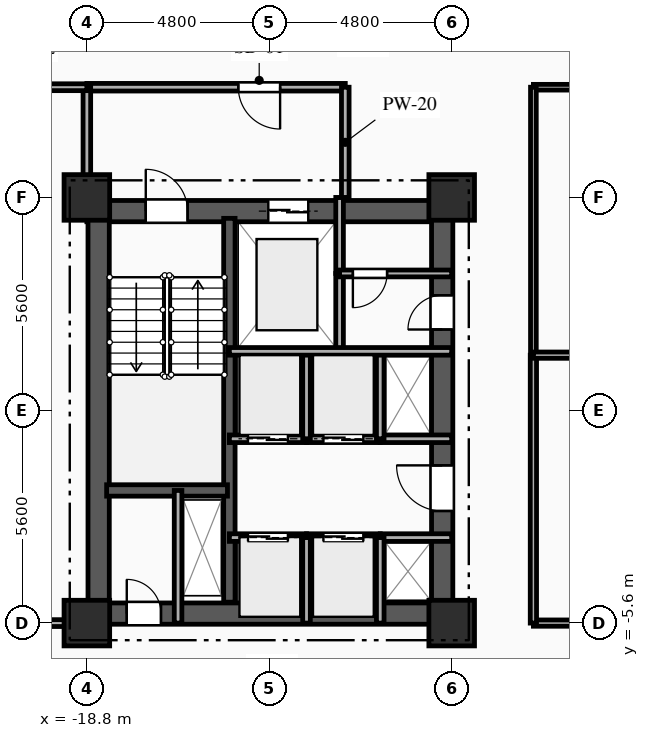
"""IFC4 building model, lengths in metres.
Left out: names, types, materials, properties, quantities, classifications, styles, units other than length and angle.
Written with IfcOpenShell. Run it as: python <this file> out.ifc"""

import sys

from ifc_helpers import new_model, si_unit, direction, frame, frame_2d, origin, origin_2d, place, context, subcontext, project, spatial, rectangle, extrude, element, fill, save


model = new_model("IFC4")
c1 = context("Model", 3, precision=1e-05, world=origin(), true_north=direction((0.0, 1.0)))
c2 = subcontext(c1, "Body", "Model", "MODEL_VIEW")
j1 = project(units=[si_unit("LENGTHUNIT", "METRE"), si_unit("PLANEANGLEUNIT", "RADIAN")], contexts=[c1])
p1 = place(None, origin())
s1 = spatial("IfcSite", under=j1, at=p1, CompositionType="ELEMENT")
p2 = place(p1, origin())
s2 = spatial("IfcBuilding", under=s1, at=p2, CompositionType="ELEMENT")
p3 = place(p2, frame((0.0, 0.0, 43.75)))
s3 = spatial("IfcBuildingStorey", under=s2, at=p3, CompositionType="ELEMENT", Elevation=43.75)
for number, where, z_axis, x_axis in (
    (1, (-18.8, -5.6, 0.0), (0.0, 0.0, 1.0), (1.0, 0.0, 0.0)),
    (2, (-18.8, 5.6, 0.0), (0.0, 0.0, 1.0), (1.0, 0.0, 0.0)),
    (3, (-9.2, -5.6, 0.0), (0.0, 0.0, 1.0), (1.0, 0.0, 0.0)),
    (4, (-9.2, 5.6, 0.0), (0.0, 0.0, 1.0), (1.0, 0.0, 0.0)),
):
    element("IfcColumn", number, at=place(p3, frame(where, z_axis=z_axis, x_axis=x_axis)), inside=s3, PredefinedType="COLUMN", context=c2, shape_type="SweptSolid", body=[
        extrude(rectangle(XDim=1.2, YDim=1.2, at=origin_2d()), origin(), (0.0, 0.0, 1.0), 3.35),
    ])
p4 = place(p3, frame((-18.8, 5.24, 0.0), z_axis=(0.0, 0.0, 1.0), x_axis=(1.0, 0.0, 0.0)))
e5 = element("IfcWall", 5, at=p4, inside=s3, PredefinedType="SHEAR", context=c2, shape_type="SweptSolid", body=[
    extrude(rectangle(XDim=9.6, YDim=0.56, at=frame_2d((4.8, 0.0))), origin(), (0.0, 0.0, 1.0), 3.035),
])
p5 = place(p4, frame((1.55, 0.0, 0.0)))
e6 = element("IfcOpeningElement", 6, at=p5, cuts=e5, PredefinedType="OPENING", context=c2, shape_type="SweptSolid", body=[
    extrude(rectangle(XDim=1.1, YDim=2.15, at=frame_2d((0.55, 1.075))), frame((0.0, 0.29, 0.0), z_axis=(0.0, -1.0, 0.0), x_axis=(1.0, 0.0, 0.0)), (0.0, 0.0, 1.0), 0.58),
])
p6 = place(p4, frame((4.775, 0.0, 0.0)))
e7 = element("IfcOpeningElement", 7, at=p6, cuts=e5, PredefinedType="OPENING", context=c2, shape_type="SweptSolid", body=[
    extrude(rectangle(XDim=1.05, YDim=2.1, at=frame_2d((0.525, 1.05))), frame((0.0, 0.29, 0.0), z_axis=(0.0, -1.0, 0.0), x_axis=(1.0, 0.0, 0.0)), (0.0, 0.0, 1.0), 0.58),
])
p7 = place(p3, frame((-18.8, -5.35, 0.0), z_axis=(0.0, 0.0, 1.0), x_axis=(1.0, 0.0, 0.0)))
e8 = element("IfcWall", 8, at=p7, inside=s3, PredefinedType="SHEAR", context=c2, shape_type="SweptSolid", body=[
    extrude(rectangle(XDim=9.6, YDim=0.56, at=frame_2d((4.8, 0.0))), origin(), (0.0, 0.0, 1.0), 3.035),
])
p8 = place(p7, frame((1.05, 0.0, 0.0)))
e9 = element("IfcOpeningElement", 9, at=p8, cuts=e8, PredefinedType="OPENING", context=c2, shape_type="SweptSolid", body=[
    extrude(rectangle(XDim=0.9, YDim=2.1, at=frame_2d((0.45, 1.05))), frame((0.0, 0.29, 0.0), z_axis=(0.0, -1.0, 0.0), x_axis=(1.0, 0.0, 0.0)), (0.0, 0.0, 1.0), 0.58),
])
p9 = place(p3, frame((-18.49, -5.05, 0.0), z_axis=(0.0, 0.0, 1.0), x_axis=(0.0, 1.0, 0.0)))
e10 = element("IfcWall", 10, at=p9, inside=s3, PredefinedType="SHEAR", context=c2, shape_type="SweptSolid", body=[
    extrude(rectangle(XDim=10.1, YDim=0.56, at=frame_2d((5.05, 0.0))), origin(), (0.0, 0.0, 1.0), 3.035),
])
p10 = place(p3, frame((-9.45, -5.05, 0.0), z_axis=(0.0, 0.0, 1.0), x_axis=(0.0, 1.0, 0.0)))
e11 = element("IfcWall", 11, at=p10, inside=s3, PredefinedType="SHEAR", context=c2, shape_type="SweptSolid", body=[
    extrude(rectangle(XDim=10.1, YDim=0.56, at=frame_2d((5.05, 0.0))), origin(), (0.0, 0.0, 1.0), 3.035),
])
p11 = place(p10, frame((7.175, 0.0, 0.0)))
e12 = element("IfcOpeningElement", 12, at=p11, cuts=e11, PredefinedType="OPENING", context=c2, shape_type="SweptSolid", body=[
    extrude(rectangle(XDim=0.9, YDim=2.1, at=frame_2d((0.45, 1.05))), frame((0.0, 0.29, 0.0), z_axis=(0.0, -1.0, 0.0), x_axis=(1.0, 0.0, 0.0)), (0.0, 0.0, 1.0), 0.58),
])
p12 = place(p10, frame((2.4, 0.0, 0.0)))
e13 = element("IfcOpeningElement", 13, at=p12, cuts=e11, PredefinedType="OPENING", context=c2, shape_type="SweptSolid", body=[
    extrude(rectangle(XDim=1.2, YDim=2.15, at=frame_2d((0.6, 1.075))), frame((0.0, 0.29, 0.0), z_axis=(0.0, -1.0, 0.0), x_axis=(1.0, 0.0, 0.0)), (0.0, 0.0, 1.0), 0.58),
])
p13 = place(p3, frame((-15.05, -5.05, 0.0), z_axis=(0.0, 0.0, 1.0), x_axis=(0.0, 1.0, 0.0)))
e14 = element("IfcWall", 14, at=p13, inside=s3, PredefinedType="SHEAR", context=c2, shape_type="SweptSolid", body=[
    extrude(rectangle(XDim=10.1, YDim=0.3, at=frame_2d((5.05, 0.0))), origin(), (0.0, 0.0, 1.0), 3.035),
])
p14 = place(p3, frame((-18.28, -2.11, 0.0), z_axis=(0.0, 0.0, 1.0), x_axis=(1.0, 0.0, 0.0)))
e15 = element("IfcWall", 15, at=p14, inside=s3, PredefinedType="SHEAR", context=c2, shape_type="SweptSolid", body=[
    extrude(rectangle(XDim=3.18, YDim=0.3, at=frame_2d((1.59, 0.0))), origin(), (0.0, 0.0, 1.0), 3.035),
])
p15 = place(p3, frame((-16.4, -5.6, 0.0), z_axis=(0.0, 0.0, 1.0), x_axis=(0.0, 1.0, 0.0)))
e16 = element("IfcWall", 16, at=p15, inside=s3, PredefinedType="PARTITIONING", context=c2, shape_type="SweptSolid", body=[
    extrude(rectangle(XDim=3.49, YDim=0.2, at=frame_2d((1.745, 0.0))), origin(), (0.0, 0.0, 1.0), 3.035),
])
p16 = place(p3, frame((-12.15, 1.55, 0.0), z_axis=(0.0, 0.0, 1.0), x_axis=(0.0, 1.0, 0.0)))
e17 = element("IfcWall", 17, at=p16, inside=s3, PredefinedType="PARTITIONING", context=c2, shape_type="SweptSolid", body=[
    extrude(rectangle(XDim=2.05, YDim=0.2, at=frame_2d((1.025, 0.0))), origin(), (0.0, 0.0, 1.0), 3.035),
])
p17 = place(p3, frame((-12.15, 3.6, 0.0), z_axis=(0.0, 0.0, 1.0), x_axis=(0.0, 1.0, 0.0)))
e18 = element("IfcWall", 18, at=p17, inside=s3, PredefinedType="PARTITIONING", context=c2, shape_type="SweptSolid", body=[
    extrude(rectangle(XDim=2.0, YDim=0.2, at=frame_2d((1.0, 0.0))), origin(), (0.0, 0.0, 1.0), 3.035),
])
p18 = place(p3, frame((-12.0, 8.5, 0.0), z_axis=(0.0, 0.0, 1.0), x_axis=(-1.0, 0.0, 0.0)))
e19 = element("IfcWall", 19, at=p18, inside=s3, PredefinedType="PARTITIONING", context=c2, shape_type="SweptSolid", body=[
    extrude(rectangle(XDim=6.8, YDim=0.2, at=frame_2d((3.4, 0.0))), origin(), (0.0, 0.0, 1.0), 3.035),
])
p19 = place(p18, frame((1.715, 0.0, 0.0)))
e20 = element("IfcOpeningElement", 20, at=p19, cuts=e19, PredefinedType="OPENING", context=c2, shape_type="SweptSolid", body=[
    extrude(rectangle(XDim=1.1, YDim=2.15, at=frame_2d((0.55, 1.075))), frame((0.0, 0.11, 0.0), z_axis=(0.0, -1.0, 0.0), x_axis=(1.0, 0.0, 0.0)), (0.0, 0.0, 1.0), 0.22),
])
p20 = place(p3, frame((-12.0, 5.6, 0.0), z_axis=(0.0, 0.0, 1.0), x_axis=(0.0, 1.0, 0.0)))
e21 = element("IfcWall", 21, at=p20, inside=s3, PredefinedType="PARTITIONING", context=c2, shape_type="SweptSolid", body=[
    extrude(rectangle(XDim=2.9, YDim=0.2, at=frame_2d((1.45, 0.0))), origin(), (0.0, 0.0, 1.0), 3.035),
])
p21 = place(p3, frame((-18.8, 8.5, 0.0), z_axis=(0.0, 0.0, 1.0), x_axis=(0.0, -1.0, 0.0)))
e22 = element("IfcWall", 22, at=p21, inside=s3, PredefinedType="PARTITIONING", context=c2, shape_type="SweptSolid", body=[
    extrude(rectangle(XDim=2.9, YDim=0.2, at=frame_2d((1.45, 0.0))), origin(), (0.0, 0.0, 1.0), 2.52),
])
p22 = place(p3, frame((-9.2, 3.6, 0.0), z_axis=(0.0, 0.0, 1.0), x_axis=(-1.0, 0.0, 0.0)))
e23 = element("IfcWall", 23, at=p22, inside=s3, PredefinedType="PARTITIONING", context=c2, shape_type="SweptSolid", body=[
    extrude(rectangle(XDim=2.95, YDim=0.18, at=frame_2d((1.475, 0.0))), origin(), (0.0, 0.0, 1.0), 3.035),
])
p23 = place(p22, frame((1.7, 0.0, 0.0)))
e24 = element("IfcOpeningElement", 24, at=p23, cuts=e23, PredefinedType="OPENING", context=c2, shape_type="SweptSolid", body=[
    extrude(rectangle(XDim=0.9, YDim=2.1, at=frame_2d((0.45, 1.05))), frame((0.0, 0.1, 0.0), z_axis=(0.0, -1.0, 0.0), x_axis=(1.0, 0.0, 0.0)), (0.0, 0.0, 1.0), 0.2),
])
p24 = place(p3, frame((-15.05, -3.35, 0.0), z_axis=(0.0, 0.0, 1.0), x_axis=(1.0, 0.0, 0.0)))
e25 = element("IfcWall", 25, at=p24, inside=s3, PredefinedType="PARTITIONING", context=c2, shape_type="SweptSolid", body=[
    extrude(rectangle(XDim=2.03, YDim=0.2, at=frame_2d((1.015, 0.0))), origin(), (0.0, 0.0, 1.0), 3.035),
])
p25 = place(p24, frame((0.49, 0.0, 0.0)))
e26 = element("IfcOpeningElement", 26, at=p25, cuts=e25, PredefinedType="OPENING", context=c2, shape_type="SweptSolid", body=[
    extrude(rectangle(XDim=1.05, YDim=2.1, at=frame_2d((0.525, 1.05))), frame((0.0, 0.11, 0.0), z_axis=(0.0, -1.0, 0.0), x_axis=(1.0, 0.0, 0.0)), (0.0, 0.0, 1.0), 0.22),
])
p26 = place(p3, frame((-13.02, -3.35, 0.0), z_axis=(0.0, 0.0, 1.0), x_axis=(1.0, 0.0, 0.0)))
e27 = element("IfcWall", 27, at=p26, inside=s3, PredefinedType="PARTITIONING", context=c2, shape_type="SweptSolid", body=[
    extrude(rectangle(XDim=1.94, YDim=0.2, at=frame_2d((0.97, 0.0))), origin(), (0.0, 0.0, 1.0), 3.035),
])
p27 = place(p26, frame((0.445, 0.0, 0.0)))
e28 = element("IfcOpeningElement", 28, at=p27, cuts=e27, PredefinedType="OPENING", context=c2, shape_type="SweptSolid", body=[
    extrude(rectangle(XDim=1.05, YDim=2.1, at=frame_2d((0.525, 1.05))), frame((0.0, 0.11, 0.0), z_axis=(0.0, -1.0, 0.0), x_axis=(1.0, 0.0, 0.0)), (0.0, 0.0, 1.0), 0.22),
])
p28 = place(p3, frame((-11.08, -3.35, 0.0), z_axis=(0.0, 0.0, 1.0), x_axis=(1.0, 0.0, 0.0)))
e29 = element("IfcWall", 29, at=p28, inside=s3, PredefinedType="PARTITIONING", context=c2, shape_type="SweptSolid", body=[
    extrude(rectangle(XDim=1.88, YDim=0.2, at=frame_2d((0.94, 0.0))), origin(), (0.0, 0.0, 1.0), 2.75),
])
p29 = place(p3, frame((-13.02, -0.75, 0.0), z_axis=(0.0, 0.0, 1.0), x_axis=(-1.0, 0.0, 0.0)))
e30 = element("IfcWall", 30, at=p29, inside=s3, PredefinedType="PARTITIONING", context=c2, shape_type="SweptSolid", body=[
    extrude(rectangle(XDim=2.03, YDim=0.2, at=frame_2d((1.015, 0.0))), origin(), (0.0, 0.0, 1.0), 3.035),
])
p30 = place(p29, frame((0.49, 0.0, 0.0)))
e31 = element("IfcOpeningElement", 31, at=p30, cuts=e30, PredefinedType="OPENING", context=c2, shape_type="SweptSolid", body=[
    extrude(rectangle(XDim=1.05, YDim=2.1, at=frame_2d((0.525, 1.05))), frame((0.0, 0.11, 0.0), z_axis=(0.0, -1.0, 0.0), x_axis=(1.0, 0.0, 0.0)), (0.0, 0.0, 1.0), 0.22),
])
p31 = place(p3, frame((-11.08, -0.75, 0.0), z_axis=(0.0, 0.0, 1.0), x_axis=(-1.0, 0.0, 0.0)))
e32 = element("IfcWall", 32, at=p31, inside=s3, PredefinedType="PARTITIONING", context=c2, shape_type="SweptSolid", body=[
    extrude(rectangle(XDim=1.94, YDim=0.2, at=frame_2d((0.97, 0.0))), origin(), (0.0, 0.0, 1.0), 3.035),
])
p32 = place(p31, frame((0.445, 0.0, 0.0)))
e33 = element("IfcOpeningElement", 33, at=p32, cuts=e32, PredefinedType="OPENING", context=c2, shape_type="SweptSolid", body=[
    extrude(rectangle(XDim=1.05, YDim=2.1, at=frame_2d((0.525, 1.05))), frame((0.0, 0.11, 0.0), z_axis=(0.0, -1.0, 0.0), x_axis=(1.0, 0.0, 0.0)), (0.0, 0.0, 1.0), 0.22),
])
p33 = place(p3, frame((-9.2, -0.75, 0.0), z_axis=(0.0, 0.0, 1.0), x_axis=(-1.0, 0.0, 0.0)))
e34 = element("IfcWall", 34, at=p33, inside=s3, PredefinedType="PARTITIONING", context=c2, shape_type="SweptSolid", body=[
    extrude(rectangle(XDim=1.88, YDim=0.2, at=frame_2d((0.94, 0.0))), origin(), (0.0, 0.0, 1.0), 3.035),
])
for number, where, z_axis, x_axis in (
    (35, (-13.02, -5.6, 0.0), (0.0, 0.0, 1.0), (0.0, 1.0, 0.0)),
    (36, (-11.08, -5.6, 0.0), (0.0, 0.0, 1.0), (0.0, 1.0, 0.0)),
):
    element("IfcWall", number, at=place(p3, frame(where, z_axis=z_axis, x_axis=x_axis)), inside=s3, PredefinedType="PARTITIONING", context=c2, shape_type="SweptSolid", body=[
        extrude(rectangle(XDim=2.25, YDim=0.2, at=frame_2d((1.125, 0.0))), origin(), (0.0, 0.0, 1.0), 3.035),
    ])
for number, where, z_axis, x_axis in (
    (37, (-13.02, -0.75, 0.0), (0.0, 0.0, 1.0), (0.0, 1.0, 0.0)),
    (38, (-11.08, -0.75, 0.0), (0.0, 0.0, 1.0), (0.0, 1.0, 0.0)),
):
    element("IfcWall", number, at=place(p3, frame(where, z_axis=z_axis, x_axis=x_axis)), inside=s3, PredefinedType="PARTITIONING", context=c2, shape_type="SweptSolid", body=[
        extrude(rectangle(XDim=2.3, YDim=0.2, at=frame_2d((1.15, 0.0))), origin(), (0.0, 0.0, 1.0), 3.035),
    ])
p34 = place(p3, frame((-18.8, 8.5, 0.0), z_axis=(0.0, 0.0, 1.0), x_axis=(-1.0, 0.0, 0.0)))
e39 = element("IfcWall", 39, at=p34, inside=s3, PredefinedType="PARTITIONING", context=c2, shape_type="SweptSolid", body=[
    extrude(rectangle(XDim=2.65, YDim=0.18, at=frame_2d((1.325, 0.0))), origin(), (0.0, 0.0, 1.0), 3.035),
])
p35 = place(p34, frame((1.009, 0.0, 0.0)))
e40 = element("IfcOpeningElement", 40, at=p35, cuts=e39, PredefinedType="OPENING", context=c2, shape_type="SweptSolid", body=[
    extrude(rectangle(XDim=1.0, YDim=2.15, at=frame_2d((0.5, 1.075))), frame((0.0, 0.1, 0.0), z_axis=(0.0, -1.0, 0.0), x_axis=(1.0, 0.0, 0.0)), (0.0, 0.0, 1.0), 0.2),
])
p36 = place(p3, frame((0.0, 8.5, 0.0), z_axis=(0.0, 0.0, 1.0), x_axis=(-1.0, 0.0, 0.0)))
e41 = element("IfcWall", 41, at=p36, inside=s3, PredefinedType="PARTITIONING", context=c2, shape_type="SweptSolid", body=[
    extrude(rectangle(XDim=7.05, YDim=0.15, at=frame_2d((3.525, 0.0))), origin(), (0.0, 0.0, 1.0), 3.035),
])
p37 = place(p36, frame((1.185, 0.0, 0.0)))
e42 = element("IfcOpeningElement", 42, at=p37, cuts=e41, PredefinedType="OPENING", context=c2, shape_type="SweptSolid", body=[
    extrude(rectangle(XDim=1.05, YDim=2.15, at=frame_2d((0.525, 1.075))), frame((0.0, 0.085, 0.0), z_axis=(0.0, -1.0, 0.0), x_axis=(1.0, 0.0, 0.0)), (0.0, 0.0, 1.0), 0.17),
])
p38 = place(p3, frame((-21.45, -5.6, 0.0), z_axis=(0.0, 0.0, 1.0), x_axis=(1.0, 0.0, 0.0)))
e43 = element("IfcWall", 43, at=p38, inside=s3, PredefinedType="PARTITIONING", context=c2, shape_type="SweptSolid", body=[
    extrude(rectangle(XDim=2.65, YDim=0.18, at=frame_2d((1.325, 0.0))), origin(), (0.0, 0.0, 1.0), 3.035),
])
p39 = place(p3, frame((-7.05, -5.6, 0.0), z_axis=(0.0, 0.0, 1.0), x_axis=(1.0, 0.0, 0.0)))
e44 = element("IfcWall", 44, at=p39, inside=s3, PredefinedType="PARTITIONING", context=c2, shape_type="SweptSolid", body=[
    extrude(rectangle(XDim=7.05, YDim=0.165, at=frame_2d((3.525, 0.0))), origin(), (0.0, 0.0, 1.0), 2.52),
])
p40 = place(p39, frame((4.728, 0.0, 0.0)))
e45 = element("IfcOpeningElement", 45, at=p40, cuts=e44, PredefinedType="OPENING", context=c2, shape_type="SweptSolid", body=[
    extrude(rectangle(XDim=1.15, YDim=2.15, at=frame_2d((0.575, 1.075))), frame((0.0, 0.093, 0.0), z_axis=(0.0, -1.0, 0.0), x_axis=(1.0, 0.0, 0.0)), (0.0, 0.0, 1.0), 0.185),
])
p41 = place(p3, frame((-7.05, 1.45, 0.0), z_axis=(0.0, 0.0, 1.0), x_axis=(0.0, -1.0, 0.0)))
e46 = element("IfcWall", 46, at=p41, inside=s3, PredefinedType="PARTITIONING", context=c2, shape_type="SweptSolid", body=[
    extrude(rectangle(XDim=7.05, YDim=0.165, at=frame_2d((3.525, 0.0))), origin(), (0.0, 0.0, 1.0), 3.035),
])
p42 = place(p3, frame((-7.05, 8.5, 0.0), z_axis=(0.0, 0.0, 1.0), x_axis=(0.0, -1.0, 0.0)))
e47 = element("IfcWall", 47, at=p42, inside=s3, PredefinedType="PARTITIONING", context=c2, shape_type="SweptSolid", body=[
    extrude(rectangle(XDim=7.05, YDim=0.15, at=frame_2d((3.525, 0.0))), origin(), (0.0, 0.0, 1.0), 3.035),
])
p43 = place(p3, frame((-7.05, 1.45, 0.0), z_axis=(0.0, 0.0, 1.0), x_axis=(1.0, 0.0, 0.0)))
e48 = element("IfcWall", 48, at=p43, inside=s3, PredefinedType="PARTITIONING", context=c2, shape_type="SweptSolid", body=[
    extrude(rectangle(XDim=14.1, YDim=0.165, at=frame_2d((7.05, 0.0))), origin(), (0.0, 0.0, 1.0), 3.035),
])
p44 = place(p3, frame((-15.05, 1.55, 0.0), z_axis=(0.0, 0.0, 1.0), x_axis=(1.0, 0.0, 0.0)))
e49 = element("IfcWall", 49, at=p44, inside=s3, PredefinedType="PARTITIONING", context=c2, shape_type="SweptSolid", body=[
    extrude(rectangle(XDim=5.85, YDim=0.2, at=frame_2d((2.925, 0.0))), origin(), (0.0, 0.0, 1.0), 3.035),
])
p45 = place(p5, origin())
e50 = element("IfcDoor", 50, at=p45, inside=s3, OperationType="SINGLE_SWING_LEFT", PredefinedType="DOOR", context=c2, shape_type="SweptSolid", body=[
    extrude(rectangle(XDim=1.1, YDim=2.15, at=frame_2d((0.55, 1.075))), frame((0.0, 0.025, 0.0), z_axis=(0.0, -1.0, 0.0), x_axis=(1.0, 0.0, 0.0)), (0.0, 0.0, 1.0), 0.05),
])
fill(e6, e50)
p46 = place(p6, origin())
e51 = element("IfcDoor", 51, at=p46, inside=s3, OperationType="DOUBLE_DOOR_SLIDING", PredefinedType="DOOR", context=c2, shape_type="SweptSolid", body=[
    extrude(rectangle(XDim=1.05, YDim=2.1, at=frame_2d((0.525, 1.05))), frame((0.0, 0.025, 0.0), z_axis=(0.0, -1.0, 0.0), x_axis=(1.0, 0.0, 0.0)), (0.0, 0.0, 1.0), 0.05),
])
fill(e7, e51)
p47 = place(p8, origin())
e52 = element("IfcDoor", 52, at=p47, inside=s3, OperationType="SINGLE_SWING_LEFT", PredefinedType="DOOR", context=c2, shape_type="SweptSolid", body=[
    extrude(rectangle(XDim=0.9, YDim=2.1, at=frame_2d((0.45, 1.05))), frame((0.0, 0.025, 0.0), z_axis=(0.0, -1.0, 0.0), x_axis=(1.0, 0.0, 0.0)), (0.0, 0.0, 1.0), 0.05),
])
fill(e9, e52)
p48 = place(p19, origin())
e53 = element("IfcDoor", 53, at=p48, inside=s3, OperationType="SINGLE_SWING_LEFT", PredefinedType="DOOR", context=c2, shape_type="SweptSolid", body=[
    extrude(rectangle(XDim=1.1, YDim=2.15, at=frame_2d((0.55, 1.075))), frame((0.0, 0.025, 0.0), z_axis=(0.0, -1.0, 0.0), x_axis=(1.0, 0.0, 0.0)), (0.0, 0.0, 1.0), 0.05),
])
fill(e20, e53)
p49 = place(p23, origin())
e54 = element("IfcDoor", 54, at=p49, inside=s3, OperationType="SINGLE_SWING_RIGHT", PredefinedType="DOOR", context=c2, shape_type="SweptSolid", body=[
    extrude(rectangle(XDim=0.9, YDim=2.1, at=frame_2d((0.45, 1.05))), frame((0.0, 0.025, 0.0), z_axis=(0.0, -1.0, 0.0), x_axis=(1.0, 0.0, 0.0)), (0.0, 0.0, 1.0), 0.05),
])
fill(e24, e54)
p50 = place(p11, origin())
e55 = element("IfcDoor", 55, at=p50, inside=s3, OperationType="SINGLE_SWING_LEFT", PredefinedType="DOOR", context=c2, shape_type="SweptSolid", body=[
    extrude(rectangle(XDim=0.9, YDim=2.1, at=frame_2d((0.45, 1.05))), frame((0.0, 0.025, 0.0), z_axis=(0.0, -1.0, 0.0), x_axis=(1.0, 0.0, 0.0)), (0.0, 0.0, 1.0), 0.05),
])
fill(e12, e55)
p51 = place(p25, origin())
e56 = element("IfcDoor", 56, at=p51, inside=s3, OperationType="DOUBLE_DOOR_SLIDING", PredefinedType="DOOR", context=c2, shape_type="SweptSolid", body=[
    extrude(rectangle(XDim=1.05, YDim=2.1, at=frame_2d((0.525, 1.05))), frame((0.0, 0.025, 0.0), z_axis=(0.0, -1.0, 0.0), x_axis=(1.0, 0.0, 0.0)), (0.0, 0.0, 1.0), 0.05),
])
fill(e26, e56)
p52 = place(p27, origin())
e57 = element("IfcDoor", 57, at=p52, inside=s3, OperationType="DOUBLE_DOOR_SLIDING", PredefinedType="DOOR", context=c2, shape_type="SweptSolid", body=[
    extrude(rectangle(XDim=1.05, YDim=2.1, at=frame_2d((0.525, 1.05))), frame((0.0, 0.025, 0.0), z_axis=(0.0, -1.0, 0.0), x_axis=(1.0, 0.0, 0.0)), (0.0, 0.0, 1.0), 0.05),
])
fill(e28, e57)
p53 = place(p30, origin())
e58 = element("IfcDoor", 58, at=p53, inside=s3, OperationType="DOUBLE_DOOR_SLIDING", PredefinedType="DOOR", context=c2, shape_type="SweptSolid", body=[
    extrude(rectangle(XDim=1.05, YDim=2.1, at=frame_2d((0.525, 1.05))), frame((0.0, 0.025, 0.0), z_axis=(0.0, -1.0, 0.0), x_axis=(1.0, 0.0, 0.0)), (0.0, 0.0, 1.0), 0.05),
])
fill(e31, e58)
p54 = place(p32, origin())
e59 = element("IfcDoor", 59, at=p54, inside=s3, OperationType="DOUBLE_DOOR_SLIDING", PredefinedType="DOOR", context=c2, shape_type="SweptSolid", body=[
    extrude(rectangle(XDim=1.05, YDim=2.1, at=frame_2d((0.525, 1.05))), frame((0.0, 0.025, 0.0), z_axis=(0.0, -1.0, 0.0), x_axis=(1.0, 0.0, 0.0)), (0.0, 0.0, 1.0), 0.05),
])
fill(e33, e59)
p55 = place(p12, origin())
e60 = element("IfcDoor", 60, at=p55, inside=s3, OperationType="SINGLE_SWING_RIGHT", PredefinedType="DOOR", context=c2, shape_type="SweptSolid", body=[
    extrude(rectangle(XDim=1.2, YDim=2.15, at=frame_2d((0.6, 1.075))), frame((0.0, 0.025, 0.0), z_axis=(0.0, -1.0, 0.0), x_axis=(1.0, 0.0, 0.0)), (0.0, 0.0, 1.0), 0.05),
])
fill(e13, e60)
save(model, sys.argv[1])
